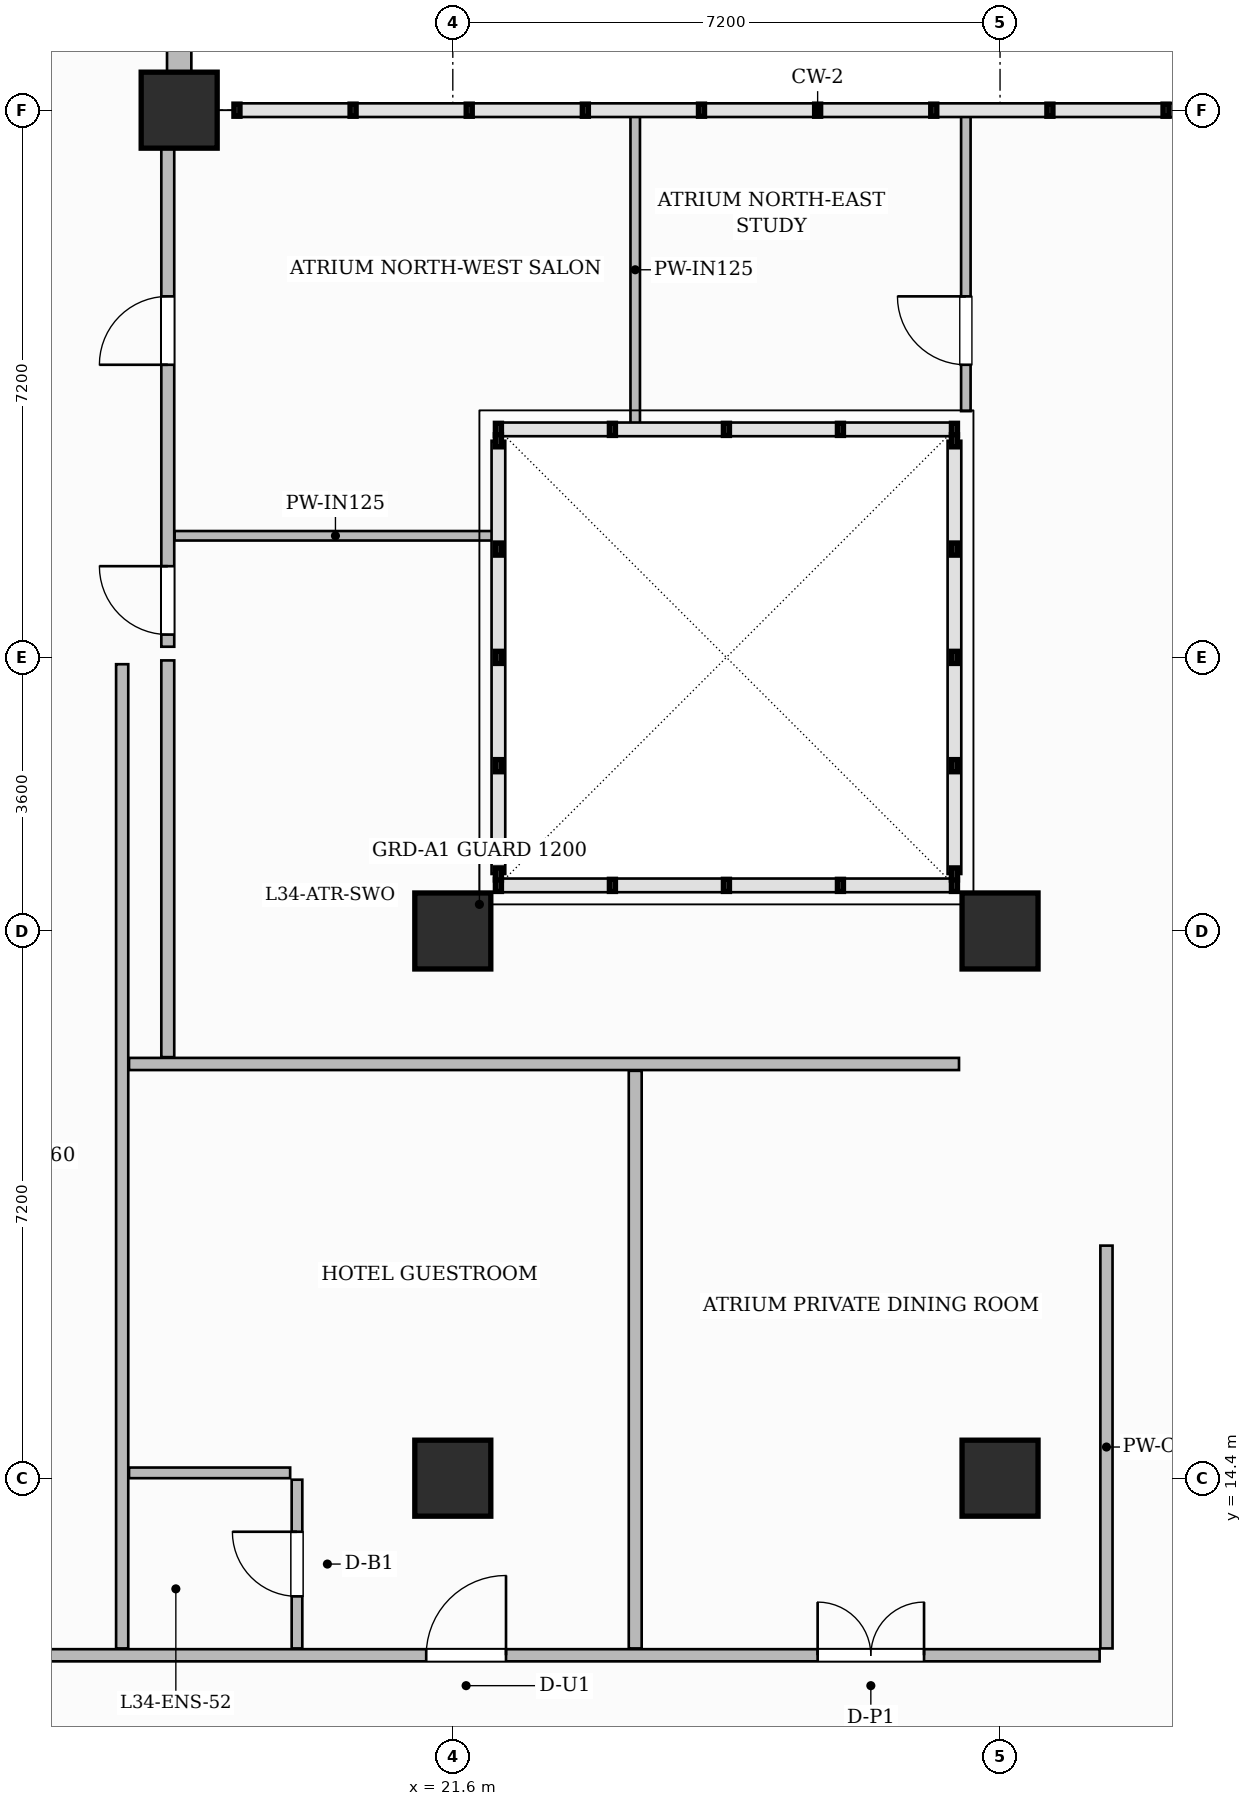
"""IFC4 building model, lengths in metres.
Left out: names, types, materials, properties, quantities, classifications, styles, units other than length and angle.
Written with IfcOpenShell. Run it as: python <this file> out.ifc"""

import sys

from ifc_helpers import new_model, si_unit, direction, frame, frame_2d, origin, origin_2d, place, context, subcontext, project, spatial, rectangle, extrude, source, transform, mapped, element, fill, save


model = new_model("IFC4")
c1 = context("Model", 3, precision=1e-05, world=origin(), true_north=direction((0.0, 1.0)))
c2 = subcontext(c1, "Body", "Model", "MODEL_VIEW")
j1 = project(units=[si_unit("LENGTHUNIT", "METRE"), si_unit("PLANEANGLEUNIT", "RADIAN")], contexts=[c1])
p1 = place(None, origin())
s1 = spatial("IfcSite", under=j1, at=p1, CompositionType="ELEMENT")
p2 = place(p1, origin())
s2 = spatial("IfcBuilding", under=s1, at=p2, CompositionType="ELEMENT")
p3 = place(p2, frame((0.0, 0.0, 137.7)))
s3 = spatial("IfcBuildingStorey", under=s2, at=p3, CompositionType="ELEMENT", Elevation=137.7)
m1 = source(origin(), c2, "Body", "SweptSolid", [
    extrude(rectangle(XDim=1.0, YDim=1.0, at=origin_2d()), origin(), (0.0, 0.0, 1.0), 3.7),
])
for number, where, z_axis, x_axis in (
    (1, (21.6, 14.4, 0.0), (0.0, 0.0, 1.0), (1.0, 0.0, 0.0)),
    (2, (21.6, 21.6, 0.0), (0.0, 0.0, 1.0), (1.0, 0.0, 0.0)),
    (3, (28.8, 14.4, 0.0), (0.0, 0.0, 1.0), (1.0, 0.0, 0.0)),
    (4, (28.8, 21.6, 0.0), (0.0, 0.0, 1.0), (1.0, 0.0, 0.0)),
    (5, (18.0, 32.4, 0.0), (0.0, 0.0, 1.0), (1.0, 0.0, 0.0)),
):
    element("IfcColumn", number, at=place(p3, frame(where, z_axis=z_axis, x_axis=x_axis)), inside=s3, PredefinedType="COLUMN", context=c2, shape_type="MappedRepresentation", body=[
        mapped(m1, transform((0.0, 0.0, 0.0), scale=1.0)),
    ])
p4 = place(p3, frame((14.568, 12.07, 0.0), z_axis=(0.0, 0.0, 1.0), x_axis=(1.0, 0.0, 0.0)))
e6 = element("IfcWall", 6, at=p4, inside=s3, PredefinedType="PARTITIONING", context=c2, shape_type="SweptSolid", body=[
    extrude(rectangle(XDim=15.542, YDim=0.16, at=frame_2d((7.771, 0.0))), origin(), (0.0, 0.0, 1.0), 3.45),
])
p5 = place(p4, frame((6.682, 0.0, 0.0)))
e7 = element("IfcOpeningElement", 7, at=p5, cuts=e6, PredefinedType="OPENING", context=c2, shape_type="SweptSolid", body=[
    extrude(rectangle(XDim=1.05, YDim=2.25, at=frame_2d((0.525, 1.125))), frame((0.0, 0.09, 0.0), z_axis=(0.0, -1.0, 0.0), x_axis=(1.0, 0.0, 0.0)), (0.0, 0.0, 1.0), 0.18),
])
p6 = place(p4, frame((11.832, 0.0, 0.0)))
e8 = element("IfcOpeningElement", 8, at=p6, cuts=e6, PredefinedType="OPENING", context=c2, shape_type="SweptSolid", body=[
    extrude(rectangle(XDim=1.4, YDim=2.35, at=frame_2d((0.7, 1.175))), frame((0.0, 0.09, 0.0), z_axis=(0.0, -1.0, 0.0), x_axis=(1.0, 0.0, 0.0)), (0.0, 0.0, 1.0), 0.18),
])
p7 = place(p3, frame((30.2, 12.16, 0.0), z_axis=(0.0, 0.0, 1.0), x_axis=(0.0, 1.0, 0.0)))
e9 = element("IfcWall", 9, at=p7, inside=s3, PredefinedType="PARTITIONING", context=c2, shape_type="SweptSolid", body=[
    extrude(rectangle(XDim=5.3, YDim=0.16, at=frame_2d((2.65, 0.0))), origin(), (0.0, 0.0, 1.0), 3.45),
])
p8 = place(p3, frame((17.25, 12.16, 0.0), z_axis=(0.0, 0.0, 1.0), x_axis=(0.0, 1.0, 0.0)))
e10 = element("IfcWall", 10, at=p8, inside=s3, PredefinedType="PARTITIONING", context=c2, shape_type="SweptSolid", body=[
    extrude(rectangle(XDim=12.95, YDim=0.16, at=frame_2d((6.475, 0.0))), origin(), (0.0, 0.0, 1.0), 3.45),
])
p9 = place(p3, frame((17.85, 19.94, 0.0), z_axis=(0.0, 0.0, 1.0), x_axis=(0.0, 1.0, 0.0)))
e11 = element("IfcWall", 11, at=p9, inside=s3, PredefinedType="PARTITIONING", context=c2, shape_type="SweptSolid", body=[
    extrude(rectangle(XDim=5.22, YDim=0.17, at=frame_2d((2.61, 0.0))), origin(), (0.0, 0.0, 1.0), 3.105),
])
p10 = place(p3, frame((17.85, 25.34, 0.0), z_axis=(0.0, 0.0, 1.0), x_axis=(0.0, 1.0, 0.0)))
e12 = element("IfcWall", 12, at=p10, inside=s3, PredefinedType="PARTITIONING", context=c2, shape_type="SweptSolid", body=[
    extrude(rectangle(XDim=6.87, YDim=0.17, at=frame_2d((3.435, 0.0))), origin(), (0.0, 0.0, 1.0), 3.45),
])
p11 = place(p10, frame((0.16, 0.0, 0.0)))
e13 = element("IfcOpeningElement", 13, at=p11, cuts=e12, PredefinedType="OPENING", context=c2, shape_type="SweptSolid", body=[
    extrude(rectangle(XDim=0.9, YDim=2.15, at=frame_2d((0.45, 1.075))), frame((0.0, 0.095, 0.0), z_axis=(0.0, -1.0, 0.0), x_axis=(1.0, 0.0, 0.0)), (0.0, 0.0, 1.0), 0.19),
])
p12 = place(p10, frame((3.71, 0.0, 0.0)))
e14 = element("IfcOpeningElement", 14, at=p12, cuts=e12, PredefinedType="OPENING", context=c2, shape_type="SweptSolid", body=[
    extrude(rectangle(XDim=0.9, YDim=2.15, at=frame_2d((0.45, 1.075))), frame((0.0, 0.095, 0.0), z_axis=(0.0, -1.0, 0.0), x_axis=(1.0, 0.0, 0.0)), (0.0, 0.0, 1.0), 0.19),
])
p13 = place(p3, frame((17.94, 26.8, 0.0), z_axis=(0.0, 0.0, 1.0), x_axis=(1.0, 0.0, 0.0)))
e15 = element("IfcWall", 15, at=p13, inside=s3, PredefinedType="PARTITIONING", context=c2, shape_type="SweptSolid", body=[
    extrude(rectangle(XDim=4.232, YDim=0.125, at=frame_2d((2.116, 0.0))), origin(), (0.0, 0.0, 1.0), 3.45),
])
p14 = place(p3, frame((24.0, 28.228, 0.0), z_axis=(0.0, 0.0, 1.0), x_axis=(0.0, 1.0, 0.0)))
e16 = element("IfcWall", 16, at=p14, inside=s3, PredefinedType="PARTITIONING", context=c2, shape_type="SweptSolid", body=[
    extrude(rectangle(XDim=4.144, YDim=0.125, at=frame_2d((2.072, 0.0))), origin(), (0.0, 0.0, 1.0), 3.45),
])
p15 = place(p3, frame((28.35, 28.44, 0.0), z_axis=(0.0, 0.0, 1.0), x_axis=(0.0, 1.0, 0.0)))
e17 = element("IfcWall", 17, at=p15, inside=s3, PredefinedType="PARTITIONING", context=c2, shape_type="SweptSolid", body=[
    extrude(rectangle(XDim=3.932, YDim=0.125, at=frame_2d((1.966, 0.0))), origin(), (0.0, 0.0, 1.0), 3.45),
])
p16 = place(p15, frame((0.61, 0.0, 0.0)))
e18 = element("IfcOpeningElement", 18, at=p16, cuts=e17, PredefinedType="OPENING", context=c2, shape_type="SweptSolid", body=[
    extrude(rectangle(XDim=0.9, YDim=2.15, at=frame_2d((0.45, 1.075))), frame((0.0, 0.073, 0.0), z_axis=(0.0, -1.0, 0.0), x_axis=(1.0, 0.0, 0.0)), (0.0, 0.0, 1.0), 0.145),
])
p17 = place(p3, frame((17.34, 19.85, 0.0), z_axis=(0.0, 0.0, 1.0), x_axis=(1.0, 0.0, 0.0)))
e19 = element("IfcWall", 19, at=p17, inside=s3, PredefinedType="PARTITIONING", context=c2, shape_type="SweptSolid", body=[
    extrude(rectangle(XDim=10.92, YDim=0.16, at=frame_2d((5.46, 0.0))), origin(), (0.0, 0.0, 1.0), 3.45),
])
p18 = place(p3, frame((24.0, 12.16, 0.0), z_axis=(0.0, 0.0, 1.0), x_axis=(0.0, 1.0, 0.0)))
e20 = element("IfcWall", 20, at=p18, inside=s3, PredefinedType="PARTITIONING", context=c2, shape_type="SweptSolid", body=[
    extrude(rectangle(XDim=7.6, YDim=0.17, at=frame_2d((3.8, 0.0))), origin(), (0.0, 0.0, 1.0), 3.45),
])
p19 = place(p3, frame((19.55, 12.16, 0.0), z_axis=(0.0, 0.0, 1.0), x_axis=(0.0, 1.0, 0.0)))
e21 = element("IfcWall", 21, at=p19, inside=s3, PredefinedType="PARTITIONING", context=c2, shape_type="SweptSolid", body=[
    extrude(rectangle(XDim=2.22, YDim=0.14, at=frame_2d((1.11, 0.0))), origin(), (0.0, 0.0, 1.0), 3.45),
])
p20 = place(p19, frame((0.685, 0.0, 0.0)))
e22 = element("IfcOpeningElement", 22, at=p20, cuts=e21, PredefinedType="OPENING", context=c2, shape_type="SweptSolid", body=[
    extrude(rectangle(XDim=0.85, YDim=2.1, at=frame_2d((0.425, 1.05))), frame((0.0, 0.08, 0.0), z_axis=(0.0, -1.0, 0.0), x_axis=(1.0, 0.0, 0.0)), (0.0, 0.0, 1.0), 0.16),
])
p21 = place(p3, frame((17.34, 14.47, 0.0), z_axis=(0.0, 0.0, 1.0), x_axis=(1.0, 0.0, 0.0)))
e23 = element("IfcWall", 23, at=p21, inside=s3, PredefinedType="PARTITIONING", context=c2, shape_type="SweptSolid", body=[
    extrude(rectangle(XDim=2.12, YDim=0.14, at=frame_2d((1.06, 0.0))), origin(), (0.0, 0.0, 1.0), 2.935),
])
p22 = place(p3, frame((18.0, 32.4, 0.0), z_axis=(0.0, 0.0, 1.0), x_axis=(0.0, 1.0, 0.0)))
e24 = element("IfcWall", 24, at=p22, inside=s3, PredefinedType="SOLIDWALL", context=c2, shape_type="SweptSolid", body=[
    extrude(rectangle(XDim=14.35, YDim=0.32, at=frame_2d((7.175, 0.0))), origin(), (0.0, 0.0, 1.0), 3.45),
])
p23 = place(p22, frame((0.85, 0.0, 0.0)))
e25 = element("IfcOpeningElement", 25, at=p23, cuts=e24, PredefinedType="OPENING", context=c2, shape_type="SweptSolid", body=[
    extrude(rectangle(XDim=1.2, YDim=2.2, at=frame_2d((0.6, 1.1))), frame((0.0, 0.17, 0.0), z_axis=(0.0, -1.0, 0.0), x_axis=(1.0, 0.0, 0.0)), (0.0, 0.0, 1.0), 0.34),
])
p24 = place(p22, frame((3.475, 0.0, 0.8)))
e26 = element("IfcOpeningElement", 26, at=p24, cuts=e24, PredefinedType="OPENING", context=c2, shape_type="SweptSolid", body=[
    extrude(rectangle(XDim=1.8, YDim=1.85, at=frame_2d((0.9, 0.925))), frame((0.0, 0.17, 0.0), z_axis=(0.0, -1.0, 0.0), x_axis=(1.0, 0.0, 0.0)), (0.0, 0.0, 1.0), 0.34),
])
p25 = place(p22, frame((8.525, 0.0, 0.8)))
e27 = element("IfcOpeningElement", 27, at=p25, cuts=e24, PredefinedType="OPENING", context=c2, shape_type="SweptSolid", body=[
    extrude(rectangle(XDim=1.8, YDim=1.85, at=frame_2d((0.9, 0.925))), frame((0.0, 0.17, 0.0), z_axis=(0.0, -1.0, 0.0), x_axis=(1.0, 0.0, 0.0)), (0.0, 0.0, 1.0), 0.34),
])
p26 = place(p22, frame((11.275, 0.0, 0.8)))
e28 = element("IfcOpeningElement", 28, at=p26, cuts=e24, PredefinedType="OPENING", context=c2, shape_type="SweptSolid", body=[
    extrude(rectangle(XDim=1.8, YDim=1.85, at=frame_2d((0.9, 0.925))), frame((0.0, 0.17, 0.0), z_axis=(0.0, -1.0, 0.0), x_axis=(1.0, 0.0, 0.0)), (0.0, 0.0, 1.0), 0.34),
])
m2 = source(origin(), c2, "Body", "SweptSolid", [
    extrude(rectangle(XDim=0.9, YDim=2.15, at=frame_2d((0.45, 1.075))), frame((0.0, 0.025, 0.0), z_axis=(0.0, -1.0, 0.0), x_axis=(1.0, 0.0, 0.0)), (0.0, 0.0, 1.0), 0.05),
])
p27 = place(p11, origin())
e29 = element("IfcDoor", 29, at=p27, inside=s3, OperationType="SINGLE_SWING_RIGHT", PredefinedType="DOOR", context=c2, shape_type="MappedRepresentation", body=[
    mapped(m2, transform((0.0, 0.0, 0.0), scale=1.0)),
])
fill(e13, e29)
p28 = place(p12, origin())
e30 = element("IfcDoor", 30, at=p28, inside=s3, OperationType="SINGLE_SWING_LEFT", PredefinedType="DOOR", context=c2, shape_type="MappedRepresentation", body=[
    mapped(m2, transform((0.0, 0.0, 0.0), scale=1.0)),
])
fill(e14, e30)
p29 = place(p16, origin())
e31 = element("IfcDoor", 31, at=p29, inside=s3, OperationType="SINGLE_SWING_RIGHT", PredefinedType="DOOR", context=c2, shape_type="MappedRepresentation", body=[
    mapped(m2, transform((0.0, 0.0, 0.0), scale=1.0)),
])
fill(e18, e31)
m3 = source(origin(), c2, "Body", "SweptSolid", [
    extrude(rectangle(XDim=0.85, YDim=2.1, at=frame_2d((0.425, 1.05))), frame((0.0, 0.025, 0.0), z_axis=(0.0, -1.0, 0.0), x_axis=(1.0, 0.0, 0.0)), (0.0, 0.0, 1.0), 0.05),
])
p30 = place(p20, origin())
e32 = element("IfcDoor", 32, at=p30, inside=s3, OperationType="SINGLE_SWING_RIGHT", PredefinedType="DOOR", context=c2, shape_type="MappedRepresentation", body=[
    mapped(m3, transform((0.0, 0.0, 0.0), scale=1.0)),
])
fill(e22, e32)
m4 = source(origin(), c2, "Body", "SweptSolid", [
    extrude(rectangle(XDim=1.05, YDim=2.25, at=frame_2d((0.525, 1.125))), frame((0.0, 0.025, 0.0), z_axis=(0.0, -1.0, 0.0), x_axis=(1.0, 0.0, 0.0)), (0.0, 0.0, 1.0), 0.05),
])
p31 = place(p5, origin())
e33 = element("IfcDoor", 33, at=p31, inside=s3, OperationType="SINGLE_SWING_RIGHT", PredefinedType="DOOR", context=c2, shape_type="MappedRepresentation", body=[
    mapped(m4, transform((0.0, 0.0, 0.0), scale=1.0)),
])
fill(e7, e33)
m5 = source(origin(), c2, "Body", "SweptSolid", [
    extrude(rectangle(XDim=1.4, YDim=2.35, at=frame_2d((0.7, 1.175))), frame((0.0, 0.025, 0.0), z_axis=(0.0, -1.0, 0.0), x_axis=(1.0, 0.0, 0.0)), (0.0, 0.0, 1.0), 0.05),
])
p32 = place(p6, origin())
e34 = element("IfcDoor", 34, at=p32, inside=s3, OperationType="DOUBLE_DOOR_SINGLE_SWING", PredefinedType="DOOR", context=c2, shape_type="MappedRepresentation", body=[
    mapped(m5, transform((0.0, 0.0, 0.0), scale=1.0)),
])
fill(e8, e34)
save(model, sys.argv[1])
